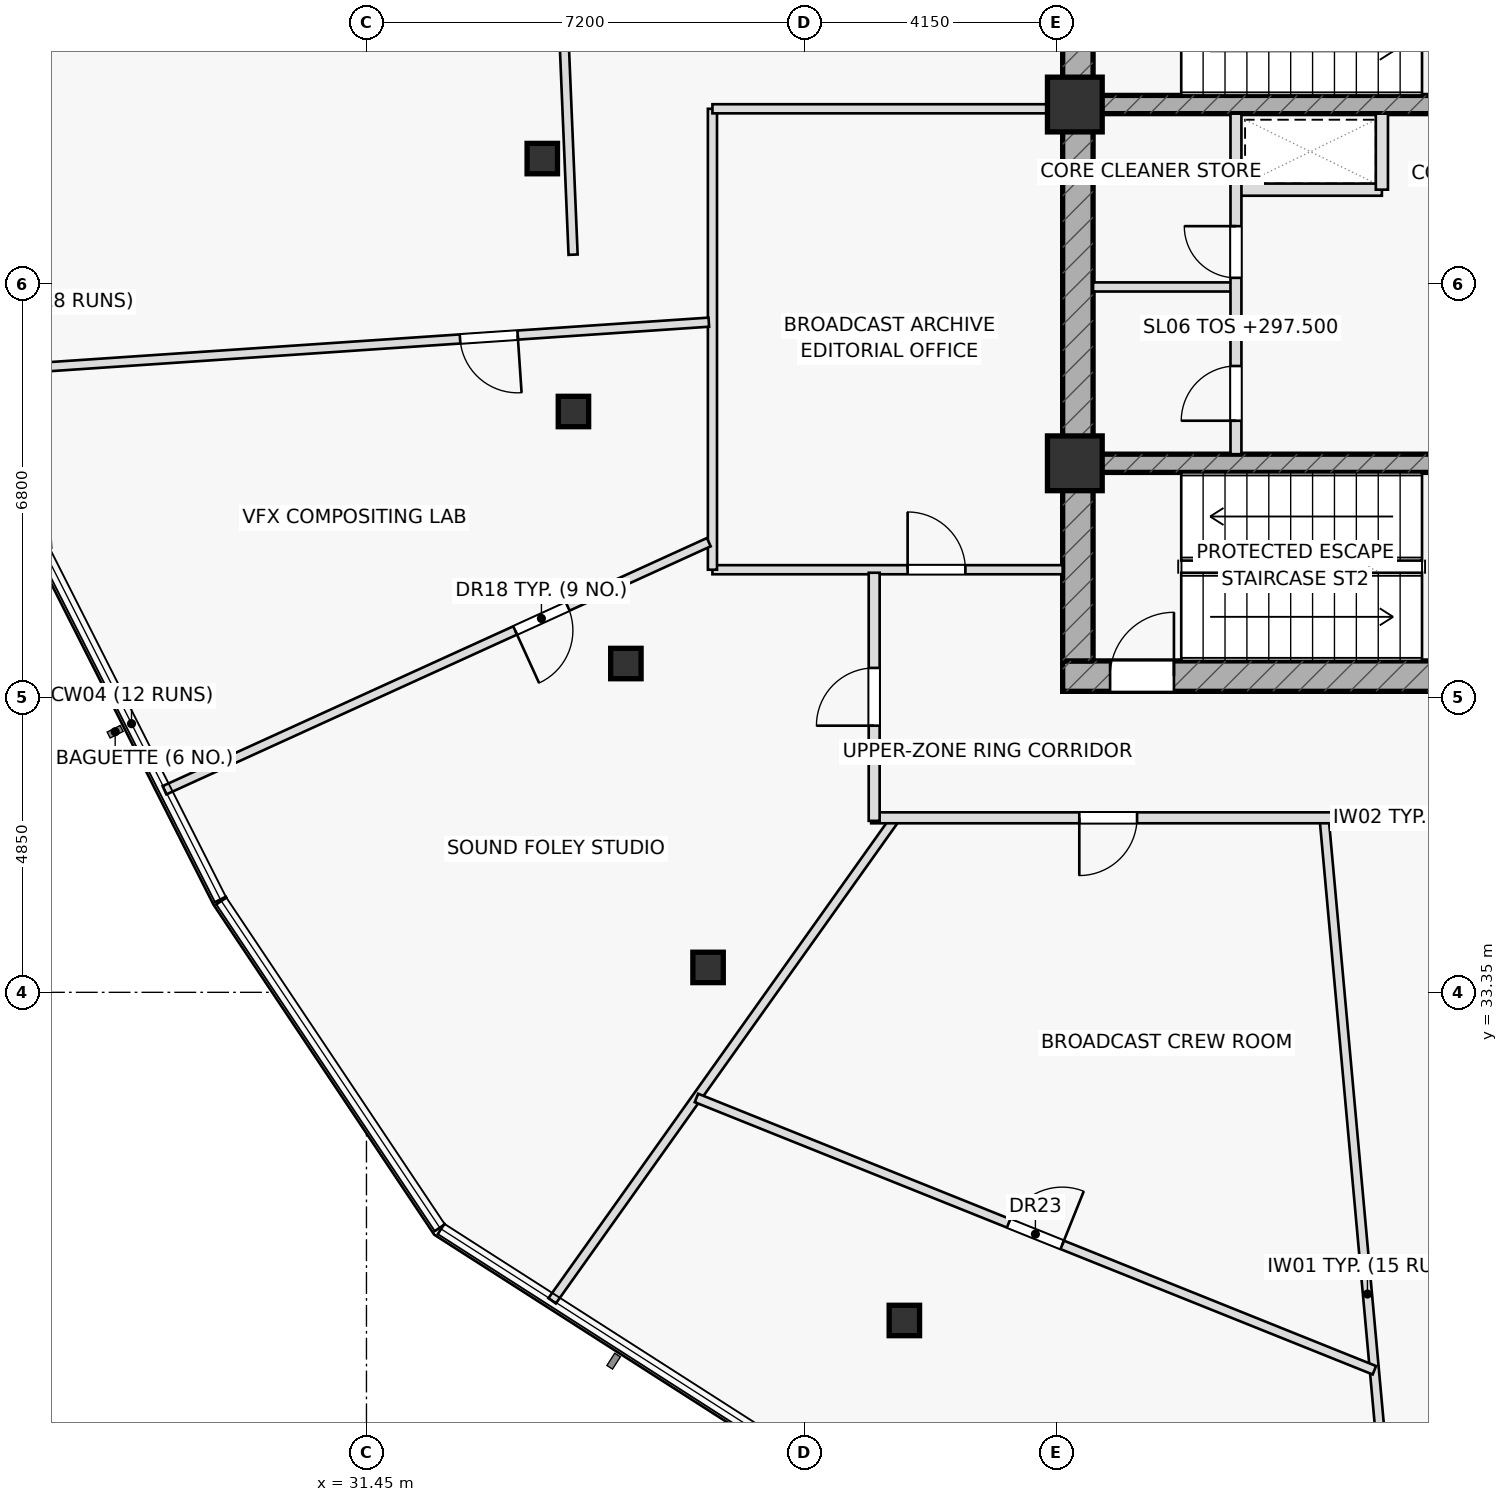
"""IFC4 building model, lengths in metres.
Left out: names, types, materials, properties, quantities, classifications, styles, units other than length and angle.
Written with IfcOpenShell. Run it as: python <this file> out.ifc"""

import sys

from ifc_helpers import new_model, si_unit, direction, frame, frame_2d, origin, origin_2d, place, context, subcontext, project, spatial, rectangle, hollow_rectangle, extrude, element, fill, save


model = new_model("IFC4")
c1 = context("Model", 3, precision=1e-05, world=origin(), true_north=direction((0.0, 1.0)))
c2 = subcontext(c1, "Body", "Model", "MODEL_VIEW")
j1 = project(units=[si_unit("LENGTHUNIT", "METRE"), si_unit("PLANEANGLEUNIT", "RADIAN")], contexts=[c1])
p1 = place(None, origin())
s1 = spatial("IfcSite", under=j1, at=p1, CompositionType="ELEMENT")
p2 = place(p1, origin())
s2 = spatial("IfcBuilding", under=s1, at=p2, CompositionType="ELEMENT")
p3 = place(p2, frame((0.0, 0.0, 297.5)))
s3 = spatial("IfcBuildingStorey", under=s2, at=p3, CompositionType="ELEMENT", Elevation=297.5)
p4 = place(p3, frame((42.9, 38.55, 0.0), z_axis=(0.0, 0.0, 1.0), x_axis=(1.0, 0.0, 0.0)))
e1 = element("IfcWall", 1, at=p4, inside=s3, PredefinedType="SHEAR", context=c2, shape_type="SweptSolid", body=[
    extrude(rectangle(XDim=14.2, YDim=0.5, at=frame_2d((7.1, 0.0))), origin(), (0.0, 0.0, 1.0), 3.7),
])
p5 = place(p4, frame((0.78, 0.0, 0.0)))
e2 = element("IfcOpeningElement", 2, at=p5, cuts=e1, PredefinedType="OPENING", context=c2, shape_type="SweptSolid", body=[
    extrude(rectangle(XDim=1.05, YDim=2.2, at=frame_2d((0.525, 1.1))), frame((0.0, 0.26, 0.0), z_axis=(0.0, -1.0, 0.0), x_axis=(1.0, 0.0, 0.0)), (0.0, 0.0, 1.0), 0.52),
])
p6 = place(p3, frame((43.15, 38.8, 0.0), z_axis=(0.0, 0.0, 1.0), x_axis=(0.0, 1.0, 0.0)))
e3 = element("IfcWall", 3, at=p6, inside=s3, PredefinedType="SHEAR", context=c2, shape_type="SweptSolid", body=[
    extrude(rectangle(XDim=12.4, YDim=0.5, at=frame_2d((6.2, 0.0))), origin(), (0.0, 0.0, 1.0), 3.7),
])
p7 = place(p3, frame((43.4, 47.95, 0.0), z_axis=(0.0, 0.0, 1.0), x_axis=(1.0, 0.0, 0.0)))
e4 = element("IfcWall", 4, at=p7, inside=s3, PredefinedType="SHEAR", context=c2, shape_type="SweptSolid", body=[
    extrude(rectangle(XDim=13.2, YDim=0.3, at=frame_2d((6.6, 0.0))), origin(), (0.0, 0.0, 1.0), 3.7),
])
p8 = place(p7, frame((8.345, 0.0, 0.0)))
e5 = element("IfcOpeningElement", 5, at=p8, cuts=e4, PredefinedType="OPENING", context=c2, shape_type="SweptSolid", body=[
    extrude(rectangle(XDim=1.15, YDim=2.2, at=frame_2d((0.575, 1.1))), frame((0.0, 0.16, 0.0), z_axis=(0.0, -1.0, 0.0), x_axis=(1.0, 0.0, 0.0)), (0.0, 0.0, 1.0), 0.32),
])
p9 = place(p7, frame((10.065, 0.0, 0.0)))
e6 = element("IfcOpeningElement", 6, at=p9, cuts=e4, PredefinedType="OPENING", context=c2, shape_type="SweptSolid", body=[
    extrude(rectangle(XDim=1.15, YDim=2.2, at=frame_2d((0.575, 1.1))), frame((0.0, 0.16, 0.0), z_axis=(0.0, -1.0, 0.0), x_axis=(1.0, 0.0, 0.0)), (0.0, 0.0, 1.0), 0.32),
])
p10 = place(p7, frame((11.645, 0.0, 0.0)))
e7 = element("IfcOpeningElement", 7, at=p10, cuts=e4, PredefinedType="OPENING", context=c2, shape_type="SweptSolid", body=[
    extrude(rectangle(XDim=1.15, YDim=2.2, at=frame_2d((0.575, 1.1))), frame((0.0, 0.16, 0.0), z_axis=(0.0, -1.0, 0.0), x_axis=(1.0, 0.0, 0.0)), (0.0, 0.0, 1.0), 0.32),
])
p11 = place(p3, frame((43.4, 42.05, 0.0), z_axis=(0.0, 0.0, 1.0), x_axis=(1.0, 0.0, 0.0)))
e8 = element("IfcWall", 8, at=p11, inside=s3, PredefinedType="SHEAR", context=c2, shape_type="SweptSolid", body=[
    extrude(rectangle(XDim=13.2, YDim=0.3, at=frame_2d((6.6, 0.0))), origin(), (0.0, 0.0, 1.0), 3.7),
])
p12 = place(p11, frame((9.1, 0.0, 0.0)))
e9 = element("IfcOpeningElement", 9, at=p12, cuts=e8, PredefinedType="OPENING", context=c2, shape_type="SweptSolid", body=[
    extrude(rectangle(XDim=1.5, YDim=2.2, at=frame_2d((0.75, 1.1))), frame((0.0, 0.16, 0.0), z_axis=(0.0, -1.0, 0.0), x_axis=(1.0, 0.0, 0.0)), (0.0, 0.0, 1.0), 0.32),
])
for number, where, z_axis, x_axis in (
    (10, (43.1, 47.95, 0.0), (0.0, 0.0, 1.0), (1.0, 0.0, 0.0)),
    (11, (43.1, 42.05, 0.0), (0.0, 0.0, 1.0), (1.0, 0.0, 0.0)),
):
    element("IfcColumn", number, at=place(p3, frame(where, z_axis=z_axis, x_axis=x_axis)), inside=s3, PredefinedType="COLUMN", context=c2, shape_type="SweptSolid", body=[
        extrude(rectangle(XDim=0.9, YDim=0.9, at=origin_2d()), origin(), (0.0, 0.0, 1.0), 3.7),
    ])
for number, where, z_axis, x_axis in (
    (12, (34.342, 47.061, 0.0), (0.0, 0.0, 1.0), (1.0, 0.0, 0.0)),
    (13, (34.854, 42.902, 0.0), (0.0, 0.0, 1.0), (1.0, 0.0, 0.0)),
    (14, (35.717, 38.757, 0.0), (0.0, 0.0, 1.0), (1.0, 0.0, 0.0)),
    (15, (37.068, 33.76, 0.0), (0.0, 0.0, 1.0), (1.0, 0.0, 0.0)),
    (16, (40.296, 27.954, 0.0), (0.0, 0.0, 1.0), (1.0, 0.0, 0.0)),
):
    element("IfcColumn", number, at=place(p3, frame(where, z_axis=z_axis, x_axis=x_axis)), inside=s3, PredefinedType="COLUMN", context=c2, shape_type="SweptSolid", body=[
        extrude(hollow_rectangle(XDim=0.5, YDim=0.5, WallThickness=0.03, at=origin_2d()), origin(), (0.0, 0.0, 1.0), 3.7),
    ])
p13 = place(p3, frame((45.75, 46.55, 0.0), z_axis=(0.0, 0.0, 1.0), x_axis=(1.0, 0.0, 0.0)))
e17 = element("IfcWall", 17, at=p13, inside=s3, PredefinedType="PARTITIONING", context=c2, shape_type="SweptSolid", body=[
    extrude(rectangle(XDim=2.4, YDim=0.2, at=frame_2d((1.2, 0.0))), origin(), (0.0, 0.0, 1.0), 3.7),
])
p14 = place(p3, frame((48.15, 46.55, 0.0), z_axis=(0.0, 0.0, 1.0), x_axis=(0.0, 1.0, 0.0)))
e18 = element("IfcWall", 18, at=p14, inside=s3, PredefinedType="PARTITIONING", context=c2, shape_type="SweptSolid", body=[
    extrude(rectangle(XDim=1.25, YDim=0.2, at=frame_2d((0.625, 0.0))), origin(), (0.0, 0.0, 1.0), 3.7),
])
p15 = place(p3, frame((43.4, 44.95, 0.0), z_axis=(0.0, 0.0, 1.0), x_axis=(1.0, 0.0, 0.0)))
e19 = element("IfcWall", 19, at=p15, inside=s3, PredefinedType="PARTITIONING", context=c2, shape_type="SweptSolid", body=[
    extrude(rectangle(XDim=2.35, YDim=0.15, at=frame_2d((1.175, 0.0))), origin(), (0.0, 0.0, 1.0), 3.7),
])
p16 = place(p3, frame((45.75, 42.2, 0.0), z_axis=(0.0, 0.0, 1.0), x_axis=(0.0, 1.0, 0.0)))
e20 = element("IfcWall", 20, at=p16, inside=s3, PredefinedType="PARTITIONING", context=c2, shape_type="SweptSolid", body=[
    extrude(rectangle(XDim=5.6, YDim=0.18, at=frame_2d((2.8, 0.0))), origin(), (0.0, 0.0, 1.0), 3.7),
])
p17 = place(p16, frame((0.55, 0.0, 0.0)))
e21 = element("IfcOpeningElement", 21, at=p17, cuts=e20, PredefinedType="OPENING", context=c2, shape_type="SweptSolid", body=[
    extrude(rectangle(XDim=0.9, YDim=2.05, at=frame_2d((0.45, 1.025))), frame((0.0, 0.1, 0.0), z_axis=(0.0, -1.0, 0.0), x_axis=(1.0, 0.0, 0.0)), (0.0, 0.0, 1.0), 0.2),
])
p18 = place(p16, frame((2.9, 0.0, 0.0)))
e22 = element("IfcOpeningElement", 22, at=p18, cuts=e20, PredefinedType="OPENING", context=c2, shape_type="SweptSolid", body=[
    extrude(rectangle(XDim=0.85, YDim=2.05, at=frame_2d((0.425, 1.025))), frame((0.0, 0.1, 0.0), z_axis=(0.0, -1.0, 0.0), x_axis=(1.0, 0.0, 0.0)), (0.0, 0.0, 1.0), 0.2),
])
p19 = place(p3, frame((34.507, 53.613, 0.0), z_axis=(0.0, 0.0, 1.0), x_axis=(0.041875090182, -0.999122853718, 0.0)))
e23 = element("IfcWall", 23, at=p19, inside=s3, PredefinedType="PARTITIONING", context=c2, shape_type="SweptSolid", body=[
    extrude(rectangle(XDim=8.139, YDim=0.15, at=frame_2d((4.069, 0.0))), origin(), (0.0, 0.0, 1.0), 3.235),
])
p20 = place(p3, frame((44.927, 22.605, 0.0), z_axis=(0.0, 0.0, 1.0), x_axis=(0.845624548895, 0.533778158326, 0.0)))
e24 = element("IfcWall", 24, at=p20, inside=s3, PredefinedType="PARTITIONING", context=c2, shape_type="SweptSolid", body=[
    extrude(rectangle(XDim=10.861, YDim=0.15, at=frame_2d((5.431, 0.0))), origin(), (0.0, 0.0, 1.0), 3.175),
])
p21 = place(p3, frame((37.14, 40.3, 0.0), z_axis=(0.0, 0.0, 1.0), x_axis=(1.0, 0.0, 0.0)))
e25 = element("IfcWall", 25, at=p21, inside=s3, PredefinedType="PARTITIONING", context=c2, shape_type="SweptSolid", body=[
    extrude(rectangle(XDim=5.76, YDim=0.15, at=frame_2d((2.88, 0.0))), origin(), (0.0, 0.0, 1.0), 3.175),
])
p22 = place(p21, frame((3.21, 0.0, 0.0)))
e26 = element("IfcOpeningElement", 26, at=p22, cuts=e25, PredefinedType="OPENING", context=c2, shape_type="SweptSolid", body=[
    extrude(rectangle(XDim=0.95, YDim=2.05, at=frame_2d((0.475, 1.025))), frame((0.0, 0.085, 0.0), z_axis=(0.0, -1.0, 0.0), x_axis=(1.0, 0.0, 0.0)), (0.0, 0.0, 1.0), 0.17),
])
p23 = place(p3, frame((37.14, 40.3, 0.0), z_axis=(0.0, 0.0, 1.0), x_axis=(0.0, 1.0, 0.0)))
e27 = element("IfcWall", 27, at=p23, inside=s3, PredefinedType="PARTITIONING", context=c2, shape_type="SweptSolid", body=[
    extrude(rectangle(XDim=7.58, YDim=0.15, at=frame_2d((3.79, 0.0))), origin(), (0.0, 0.0, 1.0), 3.7),
])
p24 = place(p3, frame((37.14, 47.88, 0.0), z_axis=(0.0, 0.0, 1.0), x_axis=(1.0, 0.0, 0.0)))
e28 = element("IfcWall", 28, at=p24, inside=s3, PredefinedType="PARTITIONING", context=c2, shape_type="SweptSolid", body=[
    extrude(rectangle(XDim=5.76, YDim=0.15, at=frame_2d((2.88, 0.0))), origin(), (0.0, 0.0, 1.0), 3.7),
])
p25 = place(p3, frame((37.08, 40.753, 0.0), z_axis=(0.0, 0.0, 1.0), x_axis=(-0.909953808147, -0.414709617732, 0.0)))
e29 = element("IfcWall", 29, at=p25, inside=s3, PredefinedType="PARTITIONING", context=c2, shape_type="SweptSolid", body=[
    extrude(rectangle(XDim=9.837, YDim=0.15, at=frame_2d((4.918, 0.0))), origin(), (0.0, 0.0, 1.0), 3.235),
])
p26 = place(p25, frame((2.55, 0.0, 0.0)))
e30 = element("IfcOpeningElement", 30, at=p26, cuts=e29, PredefinedType="OPENING", context=c2, shape_type="SweptSolid", body=[
    extrude(rectangle(XDim=0.95, YDim=2.05, at=frame_2d((0.475, 1.025))), frame((0.0, 0.085, 0.0), z_axis=(0.0, -1.0, 0.0), x_axis=(1.0, 0.0, 0.0)), (0.0, 0.0, 1.0), 0.17),
])
p27 = place(p3, frame((40.154, 36.22, 0.0), z_axis=(0.0, 0.0, 1.0), x_axis=(-0.579656851694, -0.814860683973, 0.0)))
e31 = element("IfcWall", 31, at=p27, inside=s3, PredefinedType="PARTITIONING", context=c2, shape_type="SweptSolid", body=[
    extrude(rectangle(XDim=9.748, YDim=0.15, at=frame_2d((4.874, 0.0))), origin(), (0.0, 0.0, 1.0), 3.175),
])
p28 = place(p3, frame((47.199, 36.22, 0.0), z_axis=(0.0, 0.0, 1.0), x_axis=(0.090664502259, -0.995881492965, 0.0)))
e32 = element("IfcWall", 32, at=p28, inside=s3, PredefinedType="PARTITIONING", context=c2, shape_type="SweptSolid", body=[
    extrude(rectangle(XDim=15.729, YDim=0.15, at=frame_2d((7.864, 0.0))), origin(), (0.0, 0.0, 1.0), 3.235),
])
p29 = place(p3, frame((37.08, 44.371, 0.0), z_axis=(0.0, 0.0, 1.0), x_axis=(-0.997729729575, -0.067345279876, 0.0)))
e33 = element("IfcWall", 33, at=p29, inside=s3, PredefinedType="PARTITIONING", context=c2, shape_type="SweptSolid", body=[
    extrude(rectangle(XDim=11.158, YDim=0.15, at=frame_2d((5.579, 0.0))), origin(), (0.0, 0.0, 1.0), 3.235),
])
p30 = place(p29, frame((3.15, 0.0, 0.0)))
e34 = element("IfcOpeningElement", 34, at=p30, cuts=e33, PredefinedType="OPENING", context=c2, shape_type="SweptSolid", body=[
    extrude(rectangle(XDim=0.95, YDim=2.05, at=frame_2d((0.475, 1.025))), frame((0.0, 0.085, 0.0), z_axis=(0.0, -1.0, 0.0), x_axis=(1.0, 0.0, 0.0)), (0.0, 0.0, 1.0), 0.17),
])
p31 = place(p3, frame((36.877, 31.613, 0.0), z_axis=(0.0, 0.0, 1.0), x_axis=(0.92795166299, -0.372700565003, 0.0)))
e35 = element("IfcWall", 35, at=p31, inside=s3, PredefinedType="PARTITIONING", context=c2, shape_type="SweptSolid", body=[
    extrude(rectangle(XDim=12.015, YDim=0.15, at=frame_2d((6.008, 0.0))), origin(), (0.0, 0.0, 1.0), 3.235),
])
p32 = place(p31, frame((5.532, 0.0, 0.0)))
e36 = element("IfcOpeningElement", 36, at=p32, cuts=e35, PredefinedType="OPENING", context=c2, shape_type="SweptSolid", body=[
    extrude(rectangle(XDim=0.95, YDim=2.05, at=frame_2d((0.475, 1.025))), frame((0.0, 0.085, 0.0), z_axis=(0.0, -1.0, 0.0), x_axis=(1.0, 0.0, 0.0)), (0.0, 0.0, 1.0), 0.17),
])
p33 = place(p3, frame((59.23, 36.22, 0.0), z_axis=(0.0, 0.0, 1.0), x_axis=(-1.0, 0.0, 0.0)))
e37 = element("IfcWall", 37, at=p33, inside=s3, PredefinedType="PARTITIONING", context=c2, shape_type="SweptSolid", body=[
    extrude(rectangle(XDim=19.48, YDim=0.18, at=frame_2d((9.74, 0.0))), origin(), (0.0, 0.0, 1.0), 3.175),
])
p34 = place(p33, frame((1.362, 0.0, 0.0)))
e38 = element("IfcOpeningElement", 38, at=p34, cuts=e37, PredefinedType="OPENING", context=c2, shape_type="SweptSolid", body=[
    extrude(rectangle(XDim=0.95, YDim=2.05, at=frame_2d((0.475, 1.025))), frame((0.0, 0.1, 0.0), z_axis=(0.0, -1.0, 0.0), x_axis=(1.0, 0.0, 0.0)), (0.0, 0.0, 1.0), 0.2),
])
p35 = place(p33, frame((7.276, 0.0, 0.0)))
e39 = element("IfcOpeningElement", 39, at=p35, cuts=e37, PredefinedType="OPENING", context=c2, shape_type="SweptSolid", body=[
    extrude(rectangle(XDim=0.95, YDim=2.05, at=frame_2d((0.475, 1.025))), frame((0.0, 0.1, 0.0), z_axis=(0.0, -1.0, 0.0), x_axis=(1.0, 0.0, 0.0)), (0.0, 0.0, 1.0), 0.2),
])
p36 = place(p33, frame((15.107, 0.0, 0.0)))
e40 = element("IfcOpeningElement", 40, at=p36, cuts=e37, PredefinedType="OPENING", context=c2, shape_type="SweptSolid", body=[
    extrude(rectangle(XDim=0.95, YDim=2.05, at=frame_2d((0.475, 1.025))), frame((0.0, 0.1, 0.0), z_axis=(0.0, -1.0, 0.0), x_axis=(1.0, 0.0, 0.0)), (0.0, 0.0, 1.0), 0.2),
])
p37 = place(p3, frame((39.8, 36.17, 0.0), z_axis=(0.0, 0.0, 1.0), x_axis=(0.0, 1.0, 0.0)))
e41 = element("IfcWall", 41, at=p37, inside=s3, PredefinedType="PARTITIONING", context=c2, shape_type="SweptSolid", body=[
    extrude(rectangle(XDim=4.08, YDim=0.18, at=frame_2d((2.04, 0.0))), origin(), (0.0, 0.0, 1.0), 3.435),
])
p38 = place(p37, frame((1.565, 0.0, 0.0)))
e42 = element("IfcOpeningElement", 42, at=p38, cuts=e41, PredefinedType="OPENING", context=c2, shape_type="SweptSolid", body=[
    extrude(rectangle(XDim=0.95, YDim=2.05, at=frame_2d((0.475, 1.025))), frame((0.0, 0.1, 0.0), z_axis=(0.0, -1.0, 0.0), x_axis=(1.0, 0.0, 0.0)), (0.0, 0.0, 1.0), 0.2),
])
p39 = place(p5, origin())
e43 = element("IfcDoor", 43, at=p39, inside=s3, OperationType="SINGLE_SWING_RIGHT", PredefinedType="DOOR", context=c2, shape_type="SweptSolid", body=[
    extrude(rectangle(XDim=1.05, YDim=2.2, at=frame_2d((0.525, 1.1))), frame((0.0, 0.025, 0.0), z_axis=(0.0, -1.0, 0.0), x_axis=(1.0, 0.0, 0.0)), (0.0, 0.0, 1.0), 0.05),
])
fill(e2, e43)
p40 = place(p17, origin())
e44 = element("IfcDoor", 44, at=p40, inside=s3, OperationType="SINGLE_SWING_LEFT", PredefinedType="DOOR", context=c2, shape_type="SweptSolid", body=[
    extrude(rectangle(XDim=0.9, YDim=2.05, at=frame_2d((0.45, 1.025))), frame((0.0, 0.025, 0.0), z_axis=(0.0, -1.0, 0.0), x_axis=(1.0, 0.0, 0.0)), (0.0, 0.0, 1.0), 0.05),
])
fill(e21, e44)
p41 = place(p18, origin())
e45 = element("IfcDoor", 45, at=p41, inside=s3, OperationType="SINGLE_SWING_RIGHT", PredefinedType="DOOR", context=c2, shape_type="SweptSolid", body=[
    extrude(rectangle(XDim=0.85, YDim=2.05, at=frame_2d((0.425, 1.025))), frame((0.0, 0.025, 0.0), z_axis=(0.0, -1.0, 0.0), x_axis=(1.0, 0.0, 0.0)), (0.0, 0.0, 1.0), 0.05),
])
fill(e22, e45)
p42 = place(p22, origin())
e46 = element("IfcDoor", 46, at=p42, inside=s3, OperationType="SINGLE_SWING_LEFT", PredefinedType="DOOR", context=c2, shape_type="SweptSolid", body=[
    extrude(rectangle(XDim=0.95, YDim=2.05, at=frame_2d((0.475, 1.025))), frame((0.0, 0.025, 0.0), z_axis=(0.0, -1.0, 0.0), x_axis=(1.0, 0.0, 0.0)), (0.0, 0.0, 1.0), 0.05),
])
fill(e26, e46)
p43 = place(p26, origin())
e47 = element("IfcDoor", 47, at=p43, inside=s3, OperationType="SINGLE_SWING_RIGHT", PredefinedType="DOOR", context=c2, shape_type="SweptSolid", body=[
    extrude(rectangle(XDim=0.95, YDim=2.05, at=frame_2d((0.475, 1.025))), frame((0.0, 0.025, 0.0), z_axis=(0.0, -1.0, 0.0), x_axis=(1.0, 0.0, 0.0)), (0.0, 0.0, 1.0), 0.05),
])
fill(e30, e47)
p44 = place(p30, origin())
e48 = element("IfcDoor", 48, at=p44, inside=s3, OperationType="SINGLE_SWING_LEFT", PredefinedType="DOOR", context=c2, shape_type="SweptSolid", body=[
    extrude(rectangle(XDim=0.95, YDim=2.05, at=frame_2d((0.475, 1.025))), frame((0.0, 0.025, 0.0), z_axis=(0.0, -1.0, 0.0), x_axis=(1.0, 0.0, 0.0)), (0.0, 0.0, 1.0), 0.05),
])
fill(e34, e48)
p45 = place(p32, origin())
e49 = element("IfcDoor", 49, at=p45, inside=s3, OperationType="SINGLE_SWING_RIGHT", PredefinedType="DOOR", context=c2, shape_type="SweptSolid", body=[
    extrude(rectangle(XDim=0.95, YDim=2.05, at=frame_2d((0.475, 1.025))), frame((0.0, 0.025, 0.0), z_axis=(0.0, -1.0, 0.0), x_axis=(1.0, 0.0, 0.0)), (0.0, 0.0, 1.0), 0.05),
])
fill(e36, e49)
p46 = place(p36, origin())
e50 = element("IfcDoor", 50, at=p46, inside=s3, OperationType="SINGLE_SWING_RIGHT", PredefinedType="DOOR", context=c2, shape_type="SweptSolid", body=[
    extrude(rectangle(XDim=0.95, YDim=2.05, at=frame_2d((0.475, 1.025))), frame((0.0, 0.025, 0.0), z_axis=(0.0, -1.0, 0.0), x_axis=(1.0, 0.0, 0.0)), (0.0, 0.0, 1.0), 0.05),
])
fill(e40, e50)
p47 = place(p38, origin())
e51 = element("IfcDoor", 51, at=p47, inside=s3, OperationType="SINGLE_SWING_LEFT", PredefinedType="DOOR", context=c2, shape_type="SweptSolid", body=[
    extrude(rectangle(XDim=0.95, YDim=2.05, at=frame_2d((0.475, 1.025))), frame((0.0, 0.025, 0.0), z_axis=(0.0, -1.0, 0.0), x_axis=(1.0, 0.0, 0.0)), (0.0, 0.0, 1.0), 0.05),
])
fill(e42, e51)
save(model, sys.argv[1])
